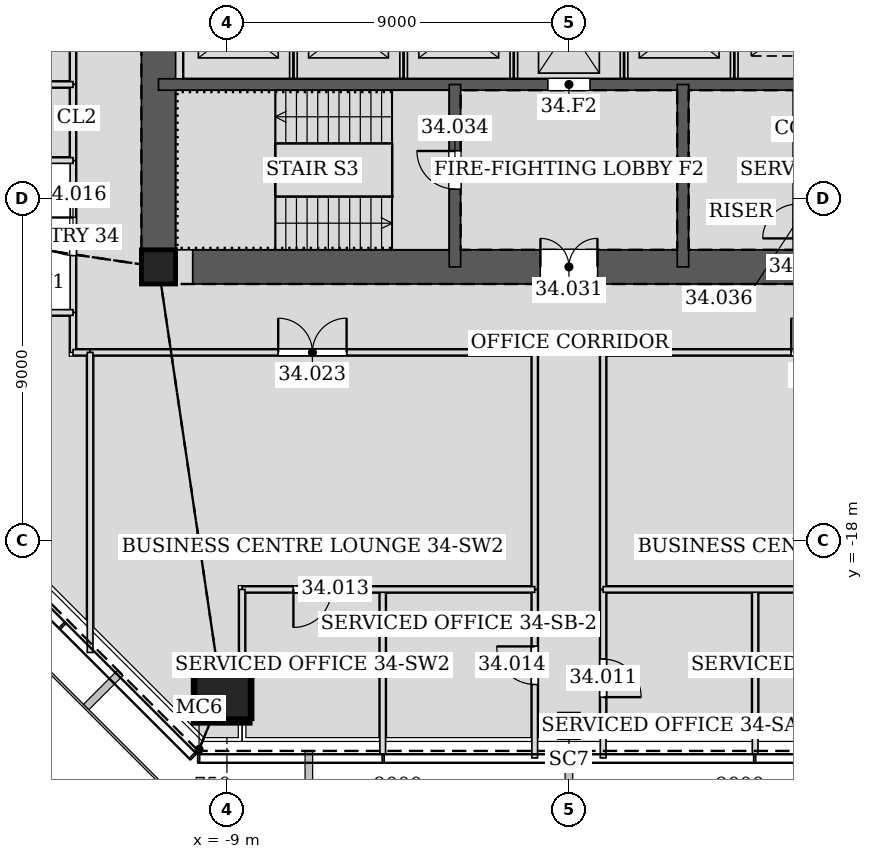
"""IFC4 building model, lengths in metres.
Left out: names, types, materials, properties, quantities, classifications, styles, units other than length and angle.
Written with IfcOpenShell. Run it as: python <this file> out.ifc"""

import sys

from ifc_helpers import new_model, si_unit, direction, frame, frame_2d, origin, origin_2d, place, context, subcontext, project, spatial, rectangle, hollow_rectangle, extrude, element, fill, save


model = new_model("IFC4")
c1 = context("Model", 3, precision=1e-05, world=origin(), true_north=direction((0.0, 1.0)))
c2 = subcontext(c1, "Body", "Model", "MODEL_VIEW")
j1 = project(units=[si_unit("LENGTHUNIT", "METRE"), si_unit("PLANEANGLEUNIT", "RADIAN")], contexts=[c1])
p1 = place(None, origin())
s1 = spatial("IfcSite", under=j1, at=p1, CompositionType="ELEMENT")
p2 = place(p1, origin())
s2 = spatial("IfcBuilding", under=s1, at=p2, CompositionType="ELEMENT")
p3 = place(p2, frame((0.0, 0.0, 151.2)))
s3 = spatial("IfcBuildingStorey", under=s2, at=p3, CompositionType="ELEMENT", Elevation=151.2)
p4 = place(p3, frame((-9.137, -22.059, 0.0), z_axis=(0.011678533143, 0.028295749455, 0.999531371407), x_axis=(-0.924363308851, 0.38151339852, 0.0)))
e1 = element("IfcColumn", 1, at=p4, inside=s3, PredefinedType="COLUMN", context=c2, shape_type="SweptSolid", body=[
    extrude(hollow_rectangle(XDim=1.5, YDim=1.5, WallThickness=0.07, at=origin_2d()), origin(), (0.0, 0.0, 1.0), 4.202),
])
p5 = place(p3, frame((0.0, -22.938, 0.0), z_axis=(0.0, 0.028297679255, 0.99959954049), x_axis=(-1.0, 0.0, 0.0)))
e2 = element("IfcColumn", 2, at=p5, inside=s3, PredefinedType="COLUMN", context=c2, shape_type="SweptSolid", body=[
    extrude(hollow_rectangle(XDim=0.5, YDim=0.5, WallThickness=0.025, at=origin_2d()), origin(), (0.0, 0.0, 1.0), 4.202),
])
p6 = place(p3, frame((-10.8, -10.8, 0.0), z_axis=(0.0, 0.0, 1.0), x_axis=(1.0, 0.0, 0.0)))
e3 = element("IfcColumn", 3, at=p6, inside=s3, PredefinedType="COLUMN", context=c2, shape_type="SweptSolid", body=[
    extrude(hollow_rectangle(XDim=0.9, YDim=0.9, WallThickness=0.06, at=origin_2d()), origin(), (0.0, 0.0, 1.0), 4.2),
])
p7 = place(p3, frame((-10.8, -10.8, 0.0), z_axis=(0.0, 0.0, 1.0), x_axis=(1.0, 0.0, 0.0)))
e4 = element("IfcWall", 4, at=p7, inside=s3, PredefinedType="SOLIDWALL", context=c2, shape_type="SweptSolid", body=[
    extrude(rectangle(XDim=21.6, YDim=0.9, at=frame_2d((10.8, 0.0))), origin(), (0.0, 0.0, 1.0), 4.2),
])
p8 = place(p7, frame((10.05, 0.0, 0.0)))
e5 = element("IfcOpeningElement", 5, at=p8, cuts=e4, PredefinedType="OPENING", context=c2, shape_type="SweptSolid", body=[
    extrude(rectangle(XDim=1.5, YDim=2.1, at=frame_2d((0.75, 1.05))), frame((0.0, 0.46, 0.0), z_axis=(0.0, -1.0, 0.0), x_axis=(1.0, 0.0, 0.0)), (0.0, 0.0, 1.0), 0.92),
])
p9 = place(p7, frame((17.1, 0.0, 0.0)))
e6 = element("IfcOpeningElement", 6, at=p9, cuts=e4, PredefinedType="OPENING", context=c2, shape_type="SweptSolid", body=[
    extrude(rectangle(XDim=0.9, YDim=2.1, at=frame_2d((0.45, 1.05))), frame((0.0, 0.46, 0.0), z_axis=(0.0, -1.0, 0.0), x_axis=(1.0, 0.0, 0.0)), (0.0, 0.0, 1.0), 0.92),
])
p10 = place(p3, frame((-10.8, 10.8, 0.0), z_axis=(0.0, 0.0, 1.0), x_axis=(0.0, -1.0, 0.0)))
e7 = element("IfcWall", 7, at=p10, inside=s3, PredefinedType="SOLIDWALL", context=c2, shape_type="SweptSolid", body=[
    extrude(rectangle(XDim=21.6, YDim=0.9, at=frame_2d((10.8, 0.0))), origin(), (0.0, 0.0, 1.0), 4.2),
])
p11 = place(p10, frame((8.7, 0.0, 0.0)))
e8 = element("IfcOpeningElement", 8, at=p11, cuts=e7, PredefinedType="OPENING", context=c2, shape_type="SweptSolid", body=[
    extrude(rectangle(XDim=1.2, YDim=2.1, at=frame_2d((0.6, 1.05))), frame((0.0, 0.46, 0.0), z_axis=(0.0, -1.0, 0.0), x_axis=(1.0, 0.0, 0.0)), (0.0, 0.0, 1.0), 0.92),
])
p12 = place(p10, frame((11.7, 0.0, 0.0)))
e9 = element("IfcOpeningElement", 9, at=p12, cuts=e7, PredefinedType="OPENING", context=c2, shape_type="SweptSolid", body=[
    extrude(rectangle(XDim=1.2, YDim=2.1, at=frame_2d((0.6, 1.05))), frame((0.0, 0.46, 0.0), z_axis=(0.0, -1.0, 0.0), x_axis=(1.0, 0.0, 0.0)), (0.0, 0.0, 1.0), 0.92),
])
p13 = place(p3, frame((-10.8, -6.0, 0.0), z_axis=(0.0, 0.0, 1.0), x_axis=(1.0, 0.0, 0.0)))
e10 = element("IfcWall", 10, at=p13, inside=s3, PredefinedType="SOLIDWALL", context=c2, shape_type="SweptSolid", body=[
    extrude(rectangle(XDim=21.6, YDim=0.3, at=frame_2d((10.8, 0.0))), origin(), (0.0, 0.0, 1.0), 4.2),
])
p14 = place(p13, frame((10.25, 0.0, 0.0)))
e11 = element("IfcOpeningElement", 11, at=p14, cuts=e10, PredefinedType="OPENING", context=c2, shape_type="SweptSolid", body=[
    extrude(rectangle(XDim=1.1, YDim=2.1, at=frame_2d((0.55, 1.05))), frame((0.0, 0.16, 0.0), z_axis=(0.0, -1.0, 0.0), x_axis=(1.0, 0.0, 0.0)), (0.0, 0.0, 1.0), 0.32),
])
p15 = place(p3, frame((-3.0, -6.0, 0.0), z_axis=(0.0, 0.0, 1.0), x_axis=(0.0, -1.0, 0.0)))
e12 = element("IfcWall", 12, at=p15, inside=s3, PredefinedType="SOLIDWALL", context=c2, shape_type="SweptSolid", body=[
    extrude(rectangle(XDim=4.8, YDim=0.3, at=frame_2d((2.4, 0.0))), origin(), (0.0, 0.0, 1.0), 4.2),
])
p16 = place(p15, frame((1.75, 0.0, 0.0)))
e13 = element("IfcOpeningElement", 13, at=p16, cuts=e12, PredefinedType="OPENING", context=c2, shape_type="SweptSolid", body=[
    extrude(rectangle(XDim=1.0, YDim=2.1, at=frame_2d((0.5, 1.05))), frame((0.0, 0.16, 0.0), z_axis=(0.0, -1.0, 0.0), x_axis=(1.0, 0.0, 0.0)), (0.0, 0.0, 1.0), 0.32),
])
p17 = place(p3, frame((3.0, -6.0, 0.0), z_axis=(0.0, 0.0, 1.0), x_axis=(0.0, -1.0, 0.0)))
e14 = element("IfcWall", 14, at=p17, inside=s3, PredefinedType="SOLIDWALL", context=c2, shape_type="SweptSolid", body=[
    extrude(rectangle(XDim=4.8, YDim=0.3, at=frame_2d((2.4, 0.0))), origin(), (0.0, 0.0, 1.0), 4.2),
])
p18 = place(p3, frame((0.9, -23.721, 0.0), z_axis=(0.0, 0.0, 1.0), x_axis=(0.0, 1.0, 0.0)))
e15 = element("IfcWall", 15, at=p18, inside=s3, PredefinedType="PARTITIONING", context=c2, shape_type="SweptSolid", body=[
    extrude(rectangle(XDim=4.435, YDim=0.15, at=frame_2d((2.217, 0.0))), origin(), (0.0, 0.0, 1.0), 3.426),
])
p19 = place(p18, frame((1.6, 0.0, 0.0)))
e16 = element("IfcOpeningElement", 16, at=p19, cuts=e15, PredefinedType="OPENING", context=c2, shape_type="SweptSolid", body=[
    extrude(rectangle(XDim=1.0, YDim=2.1, at=frame_2d((0.5, 1.05))), frame((0.0, 0.085, 0.0), z_axis=(0.0, -1.0, 0.0), x_axis=(1.0, 0.0, 0.0)), (0.0, 0.0, 1.0), 0.17),
])
p20 = place(p3, frame((-0.9, -19.287, 0.0), z_axis=(0.0, 0.0, 1.0), x_axis=(0.0, -1.0, 0.0)))
e17 = element("IfcWall", 17, at=p20, inside=s3, PredefinedType="PARTITIONING", context=c2, shape_type="SweptSolid", body=[
    extrude(rectangle(XDim=4.435, YDim=0.15, at=frame_2d((2.217, 0.0))), origin(), (0.0, 0.0, 1.0), 3.426),
])
p21 = place(p20, frame((1.5, 0.0, 0.0)))
e18 = element("IfcOpeningElement", 18, at=p21, cuts=e17, PredefinedType="OPENING", context=c2, shape_type="SweptSolid", body=[
    extrude(rectangle(XDim=1.0, YDim=2.1, at=frame_2d((0.5, 1.05))), frame((0.0, 0.085, 0.0), z_axis=(0.0, -1.0, 0.0), x_axis=(1.0, 0.0, 0.0)), (0.0, 0.0, 1.0), 0.17),
])
p22 = place(p3, frame((-13.05, -7.999, 0.0), z_axis=(0.0, 0.0, 1.0), x_axis=(0.0, -1.0, 0.0)))
e19 = element("IfcWall", 19, at=p22, inside=s3, PredefinedType="PARTITIONING", context=c2, shape_type="SweptSolid", body=[
    extrude(rectangle(XDim=4.002, YDim=0.15, at=frame_2d((2.001, 0.0))), origin(), (0.0, 0.0, 1.0), 3.098),
])
p23 = place(p22, frame((1.501, 0.0, 0.0)))
e20 = element("IfcOpeningElement", 20, at=p23, cuts=e19, PredefinedType="OPENING", context=c2, shape_type="SweptSolid", body=[
    extrude(rectangle(XDim=1.0, YDim=2.1, at=frame_2d((0.5, 1.05))), frame((0.0, 0.085, 0.0), z_axis=(0.0, -1.0, 0.0), x_axis=(1.0, 0.0, 0.0)), (0.0, 0.0, 1.0), 0.17),
])
p24 = place(p3, frame((-13.05, -0.9, 0.0), z_axis=(0.0, 0.0, 1.0), x_axis=(0.0, -1.0, 0.0)))
e21 = element("IfcWall", 21, at=p24, inside=s3, PredefinedType="PARTITIONING", context=c2, shape_type="SweptSolid", body=[
    extrude(rectangle(XDim=5.101, YDim=0.15, at=frame_2d((2.551, 0.0))), origin(), (0.0, 0.0, 1.0), 3.426),
])
p25 = place(p24, frame((1.65, 0.0, 0.0)))
e22 = element("IfcOpeningElement", 22, at=p25, cuts=e21, PredefinedType="OPENING", context=c2, shape_type="SweptSolid", body=[
    extrude(rectangle(XDim=1.8, YDim=2.4, at=frame_2d((0.9, 1.2))), frame((0.0, 0.085, 0.0), z_axis=(0.0, -1.0, 0.0), x_axis=(1.0, 0.0, 0.0)), (0.0, 0.0, 1.0), 0.17),
])
p26 = place(p3, frame((-13.05, -11.999, 0.0), z_axis=(0.0, 0.0, 1.0), x_axis=(0.0, -1.0, 0.0)))
e23 = element("IfcWall", 23, at=p26, inside=s3, PredefinedType="PARTITIONING", context=c2, shape_type="SweptSolid", body=[
    extrude(rectangle(XDim=1.051, YDim=0.15, at=frame_2d((0.525, 0.0))), origin(), (0.0, 0.0, 1.0), 3.263),
])
p27 = place(p3, frame((-13.05, -13.05, 0.0), z_axis=(0.0, 0.0, 1.0), x_axis=(1.0, 0.0, 0.0)))
e24 = element("IfcWall", 24, at=p27, inside=s3, PredefinedType="PARTITIONING", context=c2, shape_type="SweptSolid", body=[
    extrude(rectangle(XDim=0.451, YDim=0.15, at=frame_2d((0.226, 0.0))), origin(), (0.0, 0.0, 1.0), 3.263),
])
p28 = place(p3, frame((-13.05, -5.999, 0.0), z_axis=(0.0, 0.0, 1.0), x_axis=(0.0, -1.0, 0.0)))
e25 = element("IfcWall", 25, at=p28, inside=s3, PredefinedType="PARTITIONING", context=c2, shape_type="SweptSolid", body=[
    extrude(rectangle(XDim=2.002, YDim=0.15, at=frame_2d((1.001, 0.0))), origin(), (0.0, 0.0, 1.0), 3.426),
])
p29 = place(p3, frame((-12.601, -13.05, 0.0), z_axis=(0.0, 0.0, 1.0), x_axis=(1.0, 0.0, 0.0)))
e26 = element("IfcWall", 26, at=p29, inside=s3, PredefinedType="PARTITIONING", context=c2, shape_type="SweptSolid", body=[
    extrude(rectangle(XDim=11.701, YDim=0.15, at=frame_2d((5.851, 0.0))), origin(), (0.0, 0.0, 1.0), 3.098),
])
p30 = place(p29, frame((4.95, 0.0, 0.0)))
e27 = element("IfcOpeningElement", 27, at=p30, cuts=e26, PredefinedType="OPENING", context=c2, shape_type="SweptSolid", body=[
    extrude(rectangle(XDim=1.8, YDim=2.4, at=frame_2d((0.9, 1.2))), frame((0.0, 0.085, 0.0), z_axis=(0.0, -1.0, 0.0), x_axis=(1.0, 0.0, 0.0)), (0.0, 0.0, 1.0), 0.17),
])
for number, where, z_axis, x_axis in (
    (28, (-0.9, -13.05, 0.0), (0.0, 0.0, 1.0), (0.0, -1.0, 0.0)),
    (29, (0.9, -19.289, 0.0), (0.0, 0.0, 1.0), (0.0, 1.0, 0.0)),
):
    element("IfcWall", number, at=place(p3, frame(where, z_axis=z_axis, x_axis=x_axis)), inside=s3, PredefinedType="PARTITIONING", context=c2, shape_type="SweptSolid", body=[
        extrude(rectangle(XDim=6.239, YDim=0.15, at=frame_2d((3.119, 0.0))), origin(), (0.0, 0.0, 1.0), 3.426),
    ])
p31 = place(p3, frame((0.9, -13.05, 0.0), z_axis=(0.0, 0.0, 1.0), x_axis=(1.0, 0.0, 0.0)))
e30 = element("IfcWall", 30, at=p31, inside=s3, PredefinedType="PARTITIONING", context=c2, shape_type="SweptSolid", body=[
    extrude(rectangle(XDim=11.701, YDim=0.15, at=frame_2d((5.851, 0.0))), origin(), (0.0, 0.0, 1.0), 3.098),
])
p32 = place(p31, frame((4.95, 0.0, 0.0)))
e31 = element("IfcOpeningElement", 31, at=p32, cuts=e30, PredefinedType="OPENING", context=c2, shape_type="SweptSolid", body=[
    extrude(rectangle(XDim=1.8, YDim=2.4, at=frame_2d((0.9, 1.2))), frame((0.0, 0.085, 0.0), z_axis=(0.0, -1.0, 0.0), x_axis=(1.0, 0.0, 0.0)), (0.0, 0.0, 1.0), 0.17),
])
p33 = place(p3, frame((4.9, -23.62, 0.0), z_axis=(0.0, 0.0, 1.0), x_axis=(0.0, 1.0, 0.0)))
e32 = element("IfcWall", 32, at=p33, inside=s3, PredefinedType="PARTITIONING", context=c2, shape_type="SweptSolid", body=[
    extrude(rectangle(XDim=4.333, YDim=0.15, at=frame_2d((2.166, 0.0))), origin(), (0.0, 0.0, 1.0), 3.426),
])
p34 = place(p3, frame((0.9, -19.288, 0.0), z_axis=(0.0, 0.0, 1.0), x_axis=(1.0, 0.0, 0.0)))
e33 = element("IfcWall", 33, at=p34, inside=s3, PredefinedType="PARTITIONING", context=c2, shape_type="SweptSolid", body=[
    extrude(rectangle(XDim=7.7, YDim=0.15, at=frame_2d((3.85, 0.0))), origin(), (0.0, 0.0, 1.0), 4.035),
])
p35 = place(p34, frame((5.35, 0.0, 0.0)))
e34 = element("IfcOpeningElement", 34, at=p35, cuts=e33, PredefinedType="OPENING", context=c2, shape_type="SweptSolid", body=[
    extrude(rectangle(XDim=1.0, YDim=2.1, at=frame_2d((0.5, 1.05))), frame((0.0, 0.085, 0.0), z_axis=(0.0, -1.0, 0.0), x_axis=(1.0, 0.0, 0.0)), (0.0, 0.0, 1.0), 0.17),
])
p36 = place(p3, frame((-4.9, -23.62, 0.0), z_axis=(0.0, 0.0, 1.0), x_axis=(0.0, 1.0, 0.0)))
e35 = element("IfcWall", 35, at=p36, inside=s3, PredefinedType="PARTITIONING", context=c2, shape_type="SweptSolid", body=[
    extrude(rectangle(XDim=4.333, YDim=0.15, at=frame_2d((2.166, 0.0))), origin(), (0.0, 0.0, 1.0), 3.426),
])
p37 = place(p3, frame((-8.6, -19.288, 0.0), z_axis=(0.0, 0.0, 1.0), x_axis=(1.0, 0.0, 0.0)))
e36 = element("IfcWall", 36, at=p37, inside=s3, PredefinedType="PARTITIONING", context=c2, shape_type="SweptSolid", body=[
    extrude(rectangle(XDim=7.7, YDim=0.15, at=frame_2d((3.85, 0.0))), origin(), (0.0, 0.0, 1.0), 4.035),
])
p38 = place(p37, frame((1.35, 0.0, 0.0)))
e37 = element("IfcOpeningElement", 37, at=p38, cuts=e36, PredefinedType="OPENING", context=c2, shape_type="SweptSolid", body=[
    extrude(rectangle(XDim=1.0, YDim=2.1, at=frame_2d((0.5, 1.05))), frame((0.0, 0.085, 0.0), z_axis=(0.0, -1.0, 0.0), x_axis=(1.0, 0.0, 0.0)), (0.0, 0.0, 1.0), 0.17),
])
p39 = place(p3, frame((-8.6, -19.288, 0.0), z_axis=(0.0, 0.0, 1.0), x_axis=(0.0, -1.0, 0.0)))
e38 = element("IfcWall", 38, at=p39, inside=s3, PredefinedType="PARTITIONING", context=c2, shape_type="SweptSolid", body=[
    extrude(rectangle(XDim=2.022, YDim=0.15, at=frame_2d((1.011, 0.0))), origin(), (0.0, 0.0, 1.0), 3.426),
])
p40 = place(p3, frame((-8.6, -22.772, 0.0), z_axis=(0.0, 0.0, 1.0), x_axis=(0.0, -1.0, 0.0)))
e39 = element("IfcWall", 39, at=p40, inside=s3, PredefinedType="PARTITIONING", context=c2, shape_type="SweptSolid", body=[
    extrude(rectangle(XDim=0.948, YDim=0.15, at=frame_2d((0.474, 0.0))), origin(), (0.0, 0.0, 1.0), 4.035),
])
p41 = place(p3, frame((-13.05, -8.0, 0.0), z_axis=(0.0, 0.0, 1.0), x_axis=(-1.0, 0.0, 0.0)))
e40 = element("IfcWall", 40, at=p41, inside=s3, PredefinedType="PARTITIONING", context=c2, shape_type="SweptSolid", body=[
    extrude(rectangle(XDim=3.0, YDim=0.15, at=frame_2d((1.5, 0.0))), origin(), (0.0, 0.0, 1.0), 3.426),
])
p42 = place(p3, frame((-16.05, -12.0, 0.0), z_axis=(0.0, 0.0, 1.0), x_axis=(1.0, 0.0, 0.0)))
e41 = element("IfcWall", 41, at=p42, inside=s3, PredefinedType="PARTITIONING", context=c2, shape_type="SweptSolid", body=[
    extrude(rectangle(XDim=3.0, YDim=0.15, at=frame_2d((1.5, 0.0))), origin(), (0.0, 0.0, 1.0), 3.715),
])
p43 = place(p3, frame((-17.0, -6.0, 0.0), z_axis=(0.0, 0.0, 1.0), x_axis=(1.0, 0.0, 0.0)))
e42 = element("IfcWall", 42, at=p43, inside=s3, PredefinedType="PARTITIONING", context=c2, shape_type="SweptSolid", body=[
    extrude(rectangle(XDim=3.95, YDim=0.15, at=frame_2d((1.975, 0.0))), origin(), (0.0, 0.0, 1.0), 3.426),
])
p44 = place(p3, frame((-12.6, -20.946, 0.0), z_axis=(0.0, 0.0, 1.0), x_axis=(0.0, 1.0, 0.0)))
e43 = element("IfcWall", 43, at=p44, inside=s3, PredefinedType="PARTITIONING", context=c2, shape_type="SweptSolid", body=[
    extrude(rectangle(XDim=7.896, YDim=0.15, at=frame_2d((3.948, 0.0))), origin(), (0.0, 0.0, 1.0), 3.499),
])
for number, where, z_axis, x_axis in (
    (44, (-7.25, -5.85, 0.0), (0.0, 0.0, 1.0), (0.0, 1.0, 0.0)),
    (45, (-4.35, -5.85, 0.0), (0.0, 0.0, 1.0), (0.0, 1.0, 0.0)),
    (46, (-1.45, -5.85, 0.0), (0.0, 0.0, 1.0), (0.0, 1.0, 0.0)),
    (47, (1.45, -5.85, 0.0), (0.0, 0.0, 1.0), (0.0, 1.0, 0.0)),
    (48, (4.35, -5.85, 0.0), (0.0, 0.0, 1.0), (0.0, 1.0, 0.0)),
):
    element("IfcWall", number, at=place(p3, frame(where, z_axis=z_axis, x_axis=x_axis)), inside=s3, PredefinedType="PARTITIONING", context=c2, shape_type="SweptSolid", body=[
        extrude(rectangle(XDim=2.7, YDim=0.2, at=frame_2d((1.35, 0.0))), origin(), (0.0, 0.0, 1.0), 4.2),
    ])
p45 = place(p19, frame((1.0, 0.0, 0.0), z_axis=(0.0, 0.0, 1.0), x_axis=(-1.0, 0.0, 0.0)))
e49 = element("IfcDoor", 49, at=p45, inside=s3, OperationType="SINGLE_SWING_RIGHT", PredefinedType="DOOR", context=c2, shape_type="SweptSolid", body=[
    extrude(rectangle(XDim=1.0, YDim=2.1, at=frame_2d((0.5, 1.05))), frame((0.0, 0.025, 0.0), z_axis=(0.0, -1.0, 0.0), x_axis=(1.0, 0.0, 0.0)), (0.0, 0.0, 1.0), 0.05),
])
fill(e16, e49)
p46 = place(p38, frame((1.0, 0.0, 0.0), z_axis=(0.0, 0.0, 1.0), x_axis=(-1.0, 0.0, 0.0)))
e50 = element("IfcDoor", 50, at=p46, inside=s3, OperationType="SINGLE_SWING_RIGHT", PredefinedType="DOOR", context=c2, shape_type="SweptSolid", body=[
    extrude(rectangle(XDim=1.0, YDim=2.1, at=frame_2d((0.5, 1.05))), frame((0.0, 0.025, 0.0), z_axis=(0.0, -1.0, 0.0), x_axis=(1.0, 0.0, 0.0)), (0.0, 0.0, 1.0), 0.05),
])
fill(e37, e50)
p47 = place(p21, frame((1.0, 0.0, 0.0), z_axis=(0.0, 0.0, 1.0), x_axis=(-1.0, 0.0, 0.0)))
e51 = element("IfcDoor", 51, at=p47, inside=s3, OperationType="SINGLE_SWING_RIGHT", PredefinedType="DOOR", context=c2, shape_type="SweptSolid", body=[
    extrude(rectangle(XDim=1.0, YDim=2.1, at=frame_2d((0.5, 1.05))), frame((0.0, 0.025, 0.0), z_axis=(0.0, -1.0, 0.0), x_axis=(1.0, 0.0, 0.0)), (0.0, 0.0, 1.0), 0.05),
])
fill(e18, e51)
p48 = place(p23, frame((1.0, 0.0, 0.0), z_axis=(0.0, 0.0, 1.0), x_axis=(-1.0, 0.0, 0.0)))
e52 = element("IfcDoor", 52, at=p48, inside=s3, OperationType="SINGLE_SWING_RIGHT", PredefinedType="DOOR", context=c2, shape_type="SweptSolid", body=[
    extrude(rectangle(XDim=1.0, YDim=2.1, at=frame_2d((0.5, 1.05))), frame((0.0, 0.025, 0.0), z_axis=(0.0, -1.0, 0.0), x_axis=(1.0, 0.0, 0.0)), (0.0, 0.0, 1.0), 0.05),
])
fill(e20, e52)
p49 = place(p30, origin())
e53 = element("IfcDoor", 53, at=p49, inside=s3, OperationType="DOUBLE_DOOR_SINGLE_SWING", PredefinedType="DOOR", context=c2, shape_type="SweptSolid", body=[
    extrude(rectangle(XDim=1.8, YDim=2.4, at=frame_2d((0.9, 1.2))), frame((0.0, 0.025, 0.0), z_axis=(0.0, -1.0, 0.0), x_axis=(1.0, 0.0, 0.0)), (0.0, 0.0, 1.0), 0.05),
])
fill(e27, e53)
p50 = place(p32, origin())
e54 = element("IfcDoor", 54, at=p50, inside=s3, OperationType="DOUBLE_DOOR_SINGLE_SWING", PredefinedType="DOOR", context=c2, shape_type="SweptSolid", body=[
    extrude(rectangle(XDim=1.8, YDim=2.4, at=frame_2d((0.9, 1.2))), frame((0.0, 0.025, 0.0), z_axis=(0.0, -1.0, 0.0), x_axis=(1.0, 0.0, 0.0)), (0.0, 0.0, 1.0), 0.05),
])
fill(e31, e54)
p51 = place(p8, origin())
e55 = element("IfcDoor", 55, at=p51, inside=s3, OperationType="DOUBLE_DOOR_SINGLE_SWING", PredefinedType="DOOR", context=c2, shape_type="SweptSolid", body=[
    extrude(rectangle(XDim=1.5, YDim=2.1, at=frame_2d((0.75, 1.05))), frame((0.0, 0.025, 0.0), z_axis=(0.0, -1.0, 0.0), x_axis=(1.0, 0.0, 0.0)), (0.0, 0.0, 1.0), 0.05),
])
fill(e5, e55)
p52 = place(p16, frame((1.0, 0.0, 0.0), z_axis=(0.0, 0.0, 1.0), x_axis=(-1.0, 0.0, 0.0)))
e56 = element("IfcDoor", 56, at=p52, inside=s3, OperationType="SINGLE_SWING_RIGHT", PredefinedType="DOOR", context=c2, shape_type="SweptSolid", body=[
    extrude(rectangle(XDim=1.0, YDim=2.1, at=frame_2d((0.5, 1.05))), frame((0.0, 0.025, 0.0), z_axis=(0.0, -1.0, 0.0), x_axis=(1.0, 0.0, 0.0)), (0.0, 0.0, 1.0), 0.05),
])
fill(e13, e56)
p53 = place(p14, origin())
e57 = element("IfcDoor", 57, at=p53, inside=s3, OperationType="DOUBLE_DOOR_SLIDING", PredefinedType="DOOR", context=c2, shape_type="SweptSolid", body=[
    extrude(rectangle(XDim=1.1, YDim=2.1, at=frame_2d((0.55, 1.05))), frame((0.0, 0.025, 0.0), z_axis=(0.0, -1.0, 0.0), x_axis=(1.0, 0.0, 0.0)), (0.0, 0.0, 1.0), 0.05),
])
fill(e11, e57)
save(model, sys.argv[1])
